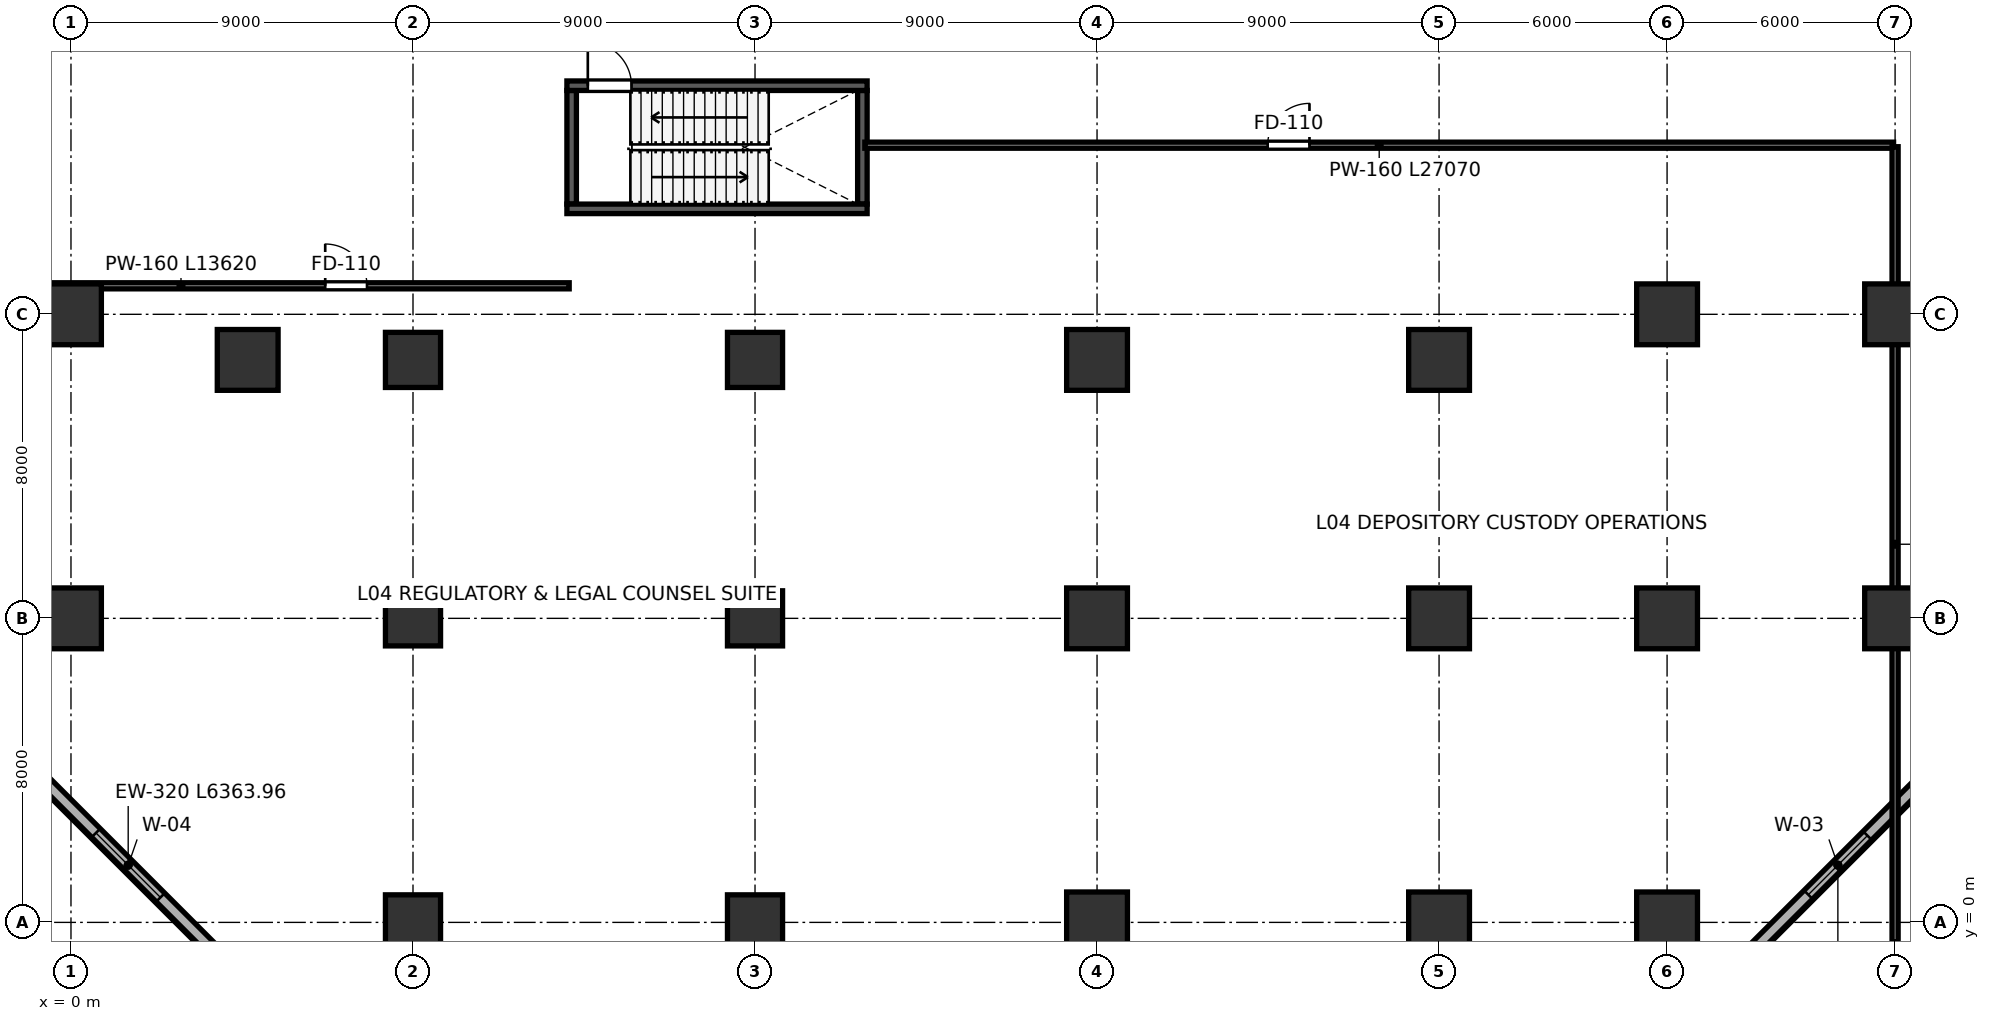
"""IFC4 building model, lengths in metres.
Left out: names, types, materials, properties, quantities, classifications, styles, units other than length and angle.
Written with IfcOpenShell. Run it as: python <this file> out.ifc"""

import sys

from ifc_helpers import new_model, si_unit, direction, frame, frame_2d, origin, origin_2d, place, context, subcontext, project, spatial, rectangle, extrude, source, transform, mapped, element, fill, save


model = new_model("IFC4")
c1 = context("Model", 3, precision=1e-05, world=origin(), true_north=direction((0.0, 1.0)))
c2 = subcontext(c1, "Body", "Model", "MODEL_VIEW")
j1 = project(units=[si_unit("LENGTHUNIT", "METRE"), si_unit("PLANEANGLEUNIT", "RADIAN")], contexts=[c1])
p1 = place(None, origin())
s1 = spatial("IfcSite", under=j1, at=p1, CompositionType="ELEMENT")
p2 = place(p1, origin())
s2 = spatial("IfcBuilding", under=s1, at=p2, CompositionType="ELEMENT")
p3 = place(p2, frame((0.0, 0.0, 17.4)))
s3 = spatial("IfcBuildingStorey", under=s2, at=p3, CompositionType="ELEMENT", Elevation=17.4)
m1 = source(origin(), c2, "Body", "SweptSolid", [
    extrude(rectangle(XDim=1.6, YDim=1.6, at=origin_2d()), origin(), (0.0, 0.0, 1.0), 4.799),
])
for number, where, z_axis, x_axis in (
    (1, (0.0, 8.0, 0.001), (0.0, 0.0, 1.0), (1.0, 0.0, 0.0)),
    (2, (0.0, 16.0, 0.001), (0.0, 0.0, 1.0), (1.0, 0.0, 0.0)),
):
    element("IfcColumn", number, at=place(p3, frame(where, z_axis=z_axis, x_axis=x_axis)), inside=s3, PredefinedType="COLUMN", context=c2, shape_type="MappedRepresentation", body=[
        mapped(m1, transform((0.0, 0.0, 0.0), scale=1.0)),
    ])
m2 = source(origin(), c2, "Body", "SweptSolid", [
    extrude(rectangle(XDim=1.45, YDim=1.45, at=origin_2d()), origin(), (0.0, 0.0, 1.0), 4.799),
])
p4 = place(p3, frame((9.0, 0.0, 0.001), z_axis=(0.0, 0.0, 1.0), x_axis=(1.0, 0.0, 0.0)))
e3 = element("IfcColumn", 3, at=p4, inside=s3, PredefinedType="COLUMN", context=c2, shape_type="MappedRepresentation", body=[
    mapped(m2, transform((0.0, 0.0, 0.0), scale=1.0)),
])
m3 = source(origin(), c2, "Body", "SweptSolid", [
    extrude(rectangle(XDim=1.45, YDim=1.45, at=origin_2d()), origin(), (0.0, 0.0, 1.0), 4.799),
])
for number, where, z_axis, x_axis in (
    (4, (9.0, 8.0, 0.001), (0.0, 0.0, 1.0), (1.0, 0.0, 0.0)),
    (5, (9.0, 14.8, 0.001), (0.0, 0.0, 1.0), (1.0, 0.0, 0.0)),
):
    element("IfcColumn", number, at=place(p3, frame(where, z_axis=z_axis, x_axis=x_axis)), inside=s3, PredefinedType="COLUMN", context=c2, shape_type="MappedRepresentation", body=[
        mapped(m3, transform((0.0, 0.0, 0.0), scale=1.0)),
    ])
p5 = place(p3, frame((18.0, 0.0, 0.001), z_axis=(0.0, 0.0, 1.0), x_axis=(1.0, 0.0, 0.0)))
e6 = element("IfcColumn", 6, at=p5, inside=s3, PredefinedType="COLUMN", context=c2, shape_type="MappedRepresentation", body=[
    mapped(m2, transform((0.0, 0.0, 0.0), scale=1.0)),
])
for number, where, z_axis, x_axis in (
    (7, (18.0, 8.0, 0.001), (0.0, 0.0, 1.0), (1.0, 0.0, 0.0)),
    (8, (18.0, 14.8, 0.001), (0.0, 0.0, 1.0), (1.0, 0.0, 0.0)),
):
    element("IfcColumn", number, at=place(p3, frame(where, z_axis=z_axis, x_axis=x_axis)), inside=s3, PredefinedType="COLUMN", context=c2, shape_type="MappedRepresentation", body=[
        mapped(m3, transform((0.0, 0.0, 0.0), scale=1.0)),
    ])
p6 = place(p3, frame((27.0, 0.0, 0.001), z_axis=(0.0, 0.0, 1.0), x_axis=(1.0, 0.0, 0.0)))
e9 = element("IfcColumn", 9, at=p6, inside=s3, PredefinedType="COLUMN", context=c2, shape_type="MappedRepresentation", body=[
    mapped(m1, transform((0.0, 0.0, 0.0), scale=1.0)),
])
m4 = source(origin(), c2, "Body", "SweptSolid", [
    extrude(rectangle(XDim=1.6, YDim=1.6, at=origin_2d()), origin(), (0.0, 0.0, 1.0), 4.799),
])
for number, where, z_axis, x_axis in (
    (10, (27.0, 8.0, 0.001), (0.0, 0.0, 1.0), (1.0, 0.0, 0.0)),
    (11, (27.0, 14.8, 0.001), (0.0, 0.0, 1.0), (1.0, 0.0, 0.0)),
):
    element("IfcColumn", number, at=place(p3, frame(where, z_axis=z_axis, x_axis=x_axis)), inside=s3, PredefinedType="COLUMN", context=c2, shape_type="MappedRepresentation", body=[
        mapped(m4, transform((0.0, 0.0, 0.0), scale=1.0)),
    ])
p7 = place(p3, frame((36.0, 0.0, 0.001), z_axis=(0.0, 0.0, 1.0), x_axis=(1.0, 0.0, 0.0)))
e12 = element("IfcColumn", 12, at=p7, inside=s3, PredefinedType="COLUMN", context=c2, shape_type="MappedRepresentation", body=[
    mapped(m1, transform((0.0, 0.0, 0.0), scale=1.0)),
])
for number, where, z_axis, x_axis in (
    (13, (36.0, 8.0, 0.001), (0.0, 0.0, 1.0), (1.0, 0.0, 0.0)),
    (14, (36.0, 14.8, 0.001), (0.0, 0.0, 1.0), (1.0, 0.0, 0.0)),
):
    element("IfcColumn", number, at=place(p3, frame(where, z_axis=z_axis, x_axis=x_axis)), inside=s3, PredefinedType="COLUMN", context=c2, shape_type="MappedRepresentation", body=[
        mapped(m4, transform((0.0, 0.0, 0.0), scale=1.0)),
    ])
p8 = place(p3, frame((42.0, 0.0, 0.001), z_axis=(0.0, 0.0, 1.0), x_axis=(1.0, 0.0, 0.0)))
e15 = element("IfcColumn", 15, at=p8, inside=s3, PredefinedType="COLUMN", context=c2, shape_type="MappedRepresentation", body=[
    mapped(m1, transform((0.0, 0.0, 0.0), scale=1.0)),
])
for number, where, z_axis, x_axis in (
    (16, (42.0, 8.0, 0.001), (0.0, 0.0, 1.0), (1.0, 0.0, 0.0)),
    (17, (42.0, 16.0, 0.001), (0.0, 0.0, 1.0), (1.0, 0.0, 0.0)),
):
    element("IfcColumn", number, at=place(p3, frame(where, z_axis=z_axis, x_axis=x_axis)), inside=s3, PredefinedType="COLUMN", context=c2, shape_type="MappedRepresentation", body=[
        mapped(m4, transform((0.0, 0.0, 0.0), scale=1.0)),
    ])
for number, where, z_axis, x_axis in (
    (18, (48.0, 8.0, 0.001), (0.0, 0.0, 1.0), (1.0, 0.0, 0.0)),
    (19, (48.0, 16.0, 0.001), (0.0, 0.0, 1.0), (1.0, 0.0, 0.0)),
):
    element("IfcColumn", number, at=place(p3, frame(where, z_axis=z_axis, x_axis=x_axis)), inside=s3, PredefinedType="COLUMN", context=c2, shape_type="MappedRepresentation", body=[
        mapped(m1, transform((0.0, 0.0, 0.0), scale=1.0)),
    ])
p9 = place(p3, frame((4.65, 14.8, 0.001), z_axis=(0.0, 0.0, 1.0), x_axis=(1.0, 0.0, 0.0)))
e20 = element("IfcColumn", 20, at=p9, inside=s3, PredefinedType="COLUMN", context=c2, shape_type="MappedRepresentation", body=[
    mapped(m4, transform((0.0, 0.0, 0.0), scale=1.0)),
])
p10 = place(p3, frame((44.244, -0.744, 0.0), z_axis=(0.0, 0.0, 1.0), x_axis=(0.707106781187, 0.707106781187, 0.0)))
e21 = element("IfcWall", 21, at=p10, inside=s3, PredefinedType="SOLIDWALL", context=c2, shape_type="SweptSolid", body=[
    extrude(rectangle(XDim=6.364, YDim=0.32, at=frame_2d((3.182, 0.0))), origin(), (0.0, 0.0, 1.0), 4.54),
])
p11 = place(p10, frame((2.082, 0.0, 0.65)))
e22 = element("IfcOpeningElement", 22, at=p11, cuts=e21, PredefinedType="OPENING", context=c2, shape_type="SweptSolid", body=[
    extrude(rectangle(XDim=2.2, YDim=2.2, at=frame_2d((1.1, 1.1))), frame((0.0, 0.17, 0.0), z_axis=(0.0, -1.0, 0.0), x_axis=(1.0, 0.0, 0.0)), (0.0, 0.0, 1.0), 0.34),
])
p12 = place(p3, frame((-0.744, 3.756, 0.0), z_axis=(0.0, 0.0, 1.0), x_axis=(0.707106781187, -0.707106781187, 0.0)))
e23 = element("IfcWall", 23, at=p12, inside=s3, PredefinedType="SOLIDWALL", context=c2, shape_type="SweptSolid", body=[
    extrude(rectangle(XDim=6.364, YDim=0.32, at=frame_2d((3.182, 0.0))), origin(), (0.0, 0.0, 1.0), 4.54),
])
p13 = place(p12, frame((1.982, 0.0, 0.65)))
e24 = element("IfcOpeningElement", 24, at=p13, cuts=e23, PredefinedType="OPENING", context=c2, shape_type="SweptSolid", body=[
    extrude(rectangle(XDim=2.4, YDim=2.2, at=frame_2d((1.2, 1.1))), frame((0.0, 0.17, 0.0), z_axis=(0.0, -1.0, 0.0), x_axis=(1.0, 0.0, 0.0)), (0.0, 0.0, 1.0), 0.34),
])
for number, where, z_axis, x_axis in (
    (25, (13.175, 18.9, 0.0), (0.0, 0.0, 1.0), (0.0, 1.0, 0.0)),
    (26, (20.825, 18.9, 0.0), (0.0, 0.0, 1.0), (0.0, 1.0, 0.0)),
):
    element("IfcWall", number, at=place(p3, frame(where, z_axis=z_axis, x_axis=x_axis)), inside=s3, PredefinedType="SHEAR", context=c2, shape_type="SweptSolid", body=[
        extrude(rectangle(XDim=2.99, YDim=0.25, at=frame_2d((1.495, 0.0))), origin(), (0.0, 0.0, 1.0), 4.54),
    ])
p14 = place(p3, frame((13.05, 18.775, 0.0), z_axis=(0.0, 0.0, 1.0), x_axis=(1.0, 0.0, 0.0)))
e27 = element("IfcWall", 27, at=p14, inside=s3, PredefinedType="SHEAR", context=c2, shape_type="SweptSolid", body=[
    extrude(rectangle(XDim=7.9, YDim=0.25, at=frame_2d((3.95, 0.0))), origin(), (0.0, 0.0, 1.0), 4.54),
])
p15 = place(p3, frame((13.05, 22.015, 0.0), z_axis=(0.0, 0.0, 1.0), x_axis=(1.0, 0.0, 0.0)))
e28 = element("IfcWall", 28, at=p15, inside=s3, PredefinedType="SHEAR", context=c2, shape_type="SweptSolid", body=[
    extrude(rectangle(XDim=7.9, YDim=0.25, at=frame_2d((3.95, 0.0))), origin(), (0.0, 0.0, 1.0), 4.54),
])
p16 = place(p15, frame((0.55, 0.0, 0.0)))
e29 = element("IfcOpeningElement", 29, at=p16, cuts=e28, PredefinedType="OPENING", context=c2, shape_type="SweptSolid", body=[
    extrude(rectangle(XDim=1.15, YDim=2.2, at=frame_2d((0.575, 1.1))), frame((0.0, 0.135, 0.0), z_axis=(0.0, -1.0, 0.0), x_axis=(1.0, 0.0, 0.0)), (0.0, 0.0, 1.0), 0.27),
])
p17 = place(p3, frame((-0.51, 16.75, 0.0), z_axis=(0.0, 0.0, 1.0), x_axis=(1.0, 0.0, 0.0)))
e30 = element("IfcWall", 30, at=p17, inside=s3, PredefinedType="PARTITIONING", context=c2, shape_type="SweptSolid", body=[
    extrude(rectangle(XDim=13.62, YDim=0.16, at=frame_2d((6.81, 0.0))), origin(), (0.0, 0.0, 1.0), 3.67),
])
p18 = place(p17, frame((7.2, 0.0, 0.0)))
e31 = element("IfcOpeningElement", 31, at=p18, cuts=e30, PredefinedType="OPENING", context=c2, shape_type="SweptSolid", body=[
    extrude(rectangle(XDim=1.1, YDim=2.2, at=frame_2d((0.55, 1.1))), frame((0.0, 0.09, 0.0), z_axis=(0.0, -1.0, 0.0), x_axis=(1.0, 0.0, 0.0)), (0.0, 0.0, 1.0), 0.18),
])
p19 = place(p3, frame((20.89, 20.45, 0.0), z_axis=(0.0, 0.0, 1.0), x_axis=(1.0, 0.0, 0.0)))
e32 = element("IfcWall", 32, at=p19, inside=s3, PredefinedType="PARTITIONING", context=c2, shape_type="SweptSolid", body=[
    extrude(rectangle(XDim=27.07, YDim=0.16, at=frame_2d((13.535, 0.0))), origin(), (0.0, 0.0, 1.0), 3.67),
])
p20 = place(p19, frame((10.6, 0.0, 0.0)))
e33 = element("IfcOpeningElement", 33, at=p20, cuts=e32, PredefinedType="OPENING", context=c2, shape_type="SweptSolid", body=[
    extrude(rectangle(XDim=1.1, YDim=2.2, at=frame_2d((0.55, 1.1))), frame((0.0, 0.09, 0.0), z_axis=(0.0, -1.0, 0.0), x_axis=(1.0, 0.0, 0.0)), (0.0, 0.0, 1.0), 0.18),
])
p21 = place(p3, frame((48.0, -0.51, 0.0), z_axis=(0.0, 0.0, 1.0), x_axis=(0.0, 1.0, 0.0)))
e34 = element("IfcWall", 34, at=p21, inside=s3, PredefinedType="PARTITIONING", context=c2, shape_type="SweptSolid", body=[
    extrude(rectangle(XDim=20.92, YDim=0.16, at=frame_2d((10.46, 0.0))), origin(), (0.0, 0.0, 1.0), 3.675),
])
m5 = source(origin(), c2, "Body", "SweptSolid", [
    extrude(rectangle(XDim=2.2, YDim=2.2, at=frame_2d((1.1, 1.1))), frame((0.0, 0.03, 0.0), z_axis=(0.0, -1.0, 0.0), x_axis=(1.0, 0.0, 0.0)), (0.0, 0.0, 1.0), 0.06),
])
p22 = place(p11, origin())
e35 = element("IfcWindow", 35, at=p22, inside=s3, PartitioningType="SINGLE_PANEL", PredefinedType="WINDOW", context=c2, shape_type="MappedRepresentation", body=[
    mapped(m5, transform((0.0, 0.0, 0.0), scale=1.0)),
])
fill(e22, e35)
m6 = source(origin(), c2, "Body", "SweptSolid", [
    extrude(rectangle(XDim=2.4, YDim=2.2, at=frame_2d((1.2, 1.1))), frame((0.0, 0.03, 0.0), z_axis=(0.0, -1.0, 0.0), x_axis=(1.0, 0.0, 0.0)), (0.0, 0.0, 1.0), 0.06),
])
p23 = place(p13, origin())
e36 = element("IfcWindow", 36, at=p23, inside=s3, PartitioningType="DOUBLE_PANEL_VERTICAL", PredefinedType="WINDOW", context=c2, shape_type="MappedRepresentation", body=[
    mapped(m6, transform((0.0, 0.0, 0.0), scale=1.0)),
])
fill(e24, e36)
m7 = source(origin(), c2, "Body", "SweptSolid", [
    extrude(rectangle(XDim=1.15, YDim=2.2, at=frame_2d((0.575, 1.1))), frame((0.0, 0.025, 0.0), z_axis=(0.0, -1.0, 0.0), x_axis=(1.0, 0.0, 0.0)), (0.0, 0.0, 1.0), 0.05),
])
p24 = place(p16, origin())
e37 = element("IfcDoor", 37, at=p24, inside=s3, OperationType="SINGLE_SWING_LEFT", PredefinedType="DOOR", context=c2, shape_type="MappedRepresentation", body=[
    mapped(m7, transform((0.0, 0.0, 0.0), scale=1.0)),
])
fill(e29, e37)
m8 = source(origin(), c2, "Body", "SweptSolid", [
    extrude(rectangle(XDim=1.1, YDim=2.2, at=frame_2d((0.55, 1.1))), frame((0.0, 0.025, 0.0), z_axis=(0.0, -1.0, 0.0), x_axis=(1.0, 0.0, 0.0)), (0.0, 0.0, 1.0), 0.05),
])
p25 = place(p18, origin())
e38 = element("IfcDoor", 38, at=p25, inside=s3, OperationType="SINGLE_SWING_LEFT", PredefinedType="DOOR", context=c2, shape_type="MappedRepresentation", body=[
    mapped(m8, transform((0.0, 0.0, 0.0), scale=1.0)),
])
fill(e31, e38)
p26 = place(p20, origin())
e39 = element("IfcDoor", 39, at=p26, inside=s3, OperationType="SINGLE_SWING_RIGHT", PredefinedType="DOOR", context=c2, shape_type="MappedRepresentation", body=[
    mapped(m8, transform((0.0, 0.0, 0.0), scale=1.0)),
])
fill(e33, e39)
save(model, sys.argv[1])
